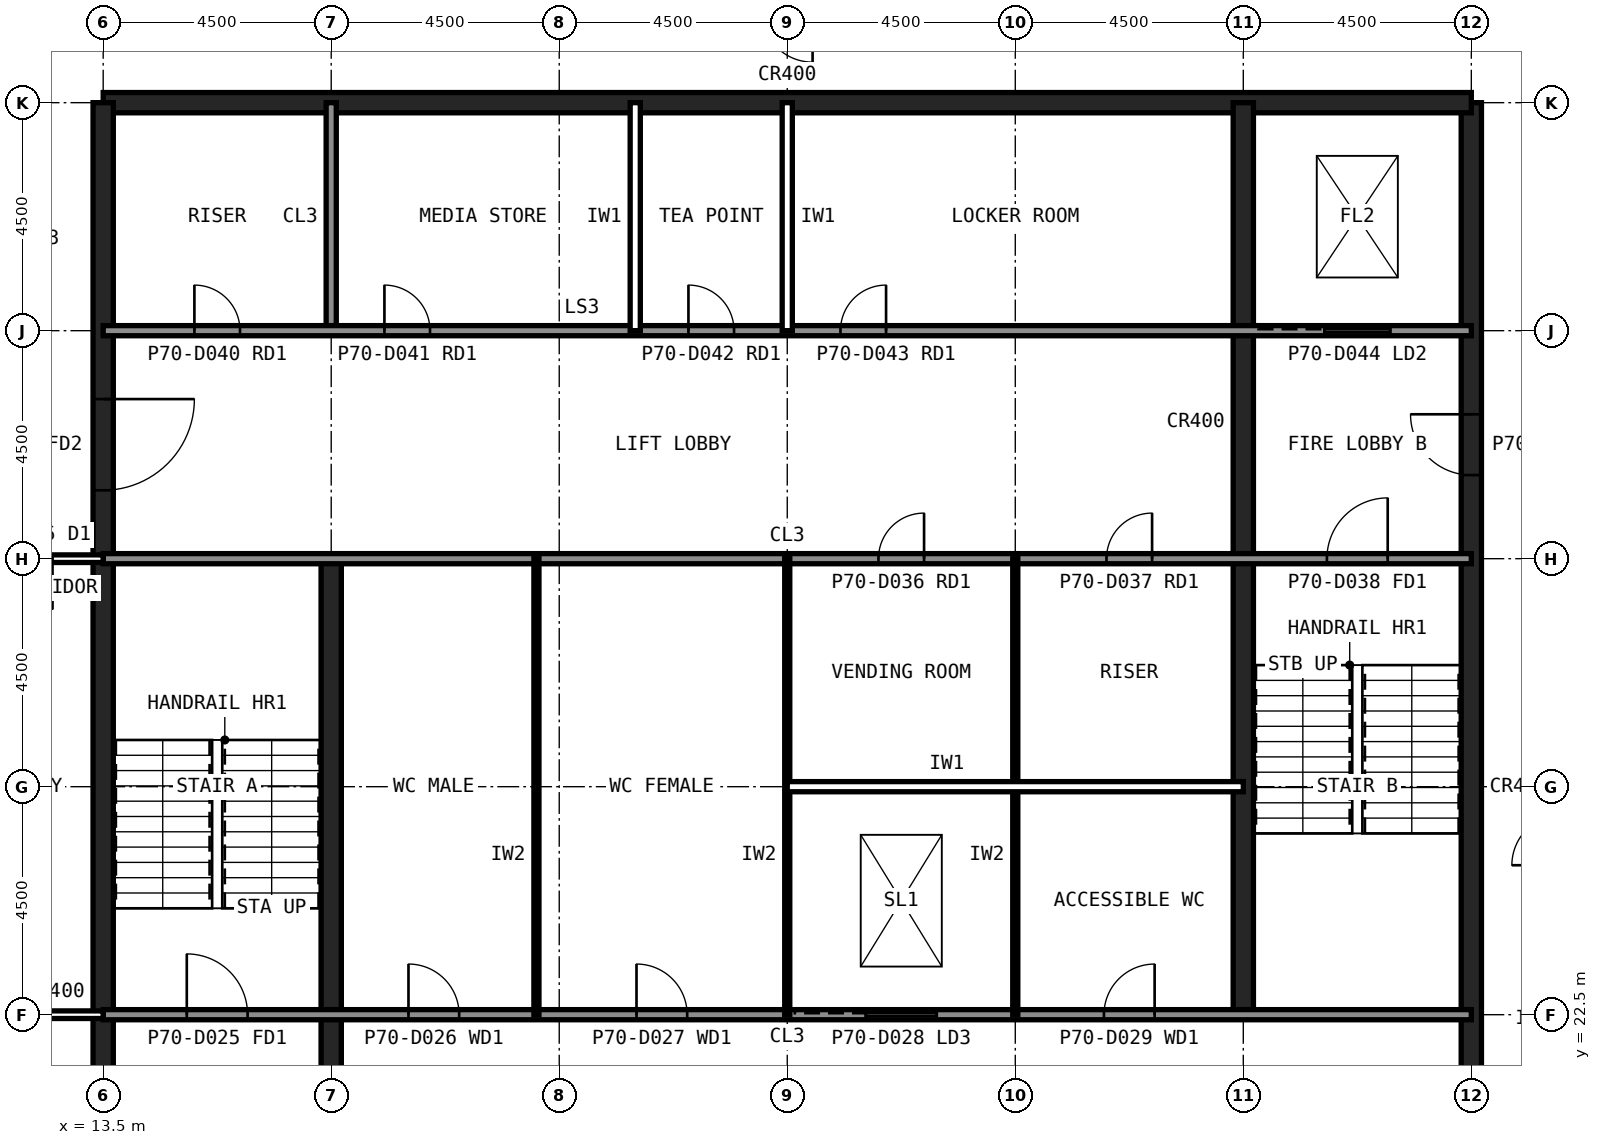
"""IFC4 building model, lengths in metres.
Left out: names, types, materials, properties, quantities, classifications, styles, units other than length and angle.
Written with IfcOpenShell. Run it as: python <this file> out.ifc"""

import sys

from ifc_helpers import new_model, si_unit, direction, frame, frame_2d, origin, place, context, subcontext, project, spatial, rectangle, extrude, element, fill, save


model = new_model("IFC4")
c1 = context("Model", 3, precision=1e-05, world=origin(), true_north=direction((0.0, 1.0)))
c2 = subcontext(c1, "Body", "Model", "MODEL_VIEW")
j1 = project(units=[si_unit("LENGTHUNIT", "METRE"), si_unit("PLANEANGLEUNIT", "RADIAN")], contexts=[c1])
p1 = place(None, origin())
s1 = spatial("IfcSite", under=j1, at=p1, CompositionType="ELEMENT")
p2 = place(p1, origin())
s2 = spatial("IfcBuilding", under=s1, at=p2, CompositionType="ELEMENT")
p3 = place(p2, frame((0.0, 0.0, 294.6)))
s3 = spatial("IfcBuildingStorey", under=s2, at=p3, CompositionType="ELEMENT", Elevation=294.6)
p4 = place(p3, frame((40.5, 13.5, 0.0), z_axis=(0.0, 0.0, 1.0), x_axis=(0.0, 1.0, 0.0)))
e1 = element("IfcWall", 1, at=p4, inside=s3, PredefinedType="SHEAR", context=c2, shape_type="SweptSolid", body=[
    extrude(rectangle(XDim=27.0, YDim=0.4, at=frame_2d((13.5, 0.0))), origin(), (0.0, 0.0, 1.0), 4.0),
])
p5 = place(p4, frame((5.85, 0.0, 0.0)))
e2 = element("IfcOpeningElement", 2, at=p5, cuts=e1, PredefinedType="OPENING", context=c2, shape_type="SweptSolid", body=[
    extrude(rectangle(XDim=1.8, YDim=2.1, at=frame_2d((0.9, 1.05))), frame((0.0, 0.21, 0.0), z_axis=(0.0, -1.0, 0.0), x_axis=(1.0, 0.0, 0.0)), (0.0, 0.0, 1.0), 0.42),
])
p6 = place(p4, frame((19.65, 0.0, 0.0)))
e3 = element("IfcOpeningElement", 3, at=p6, cuts=e1, PredefinedType="OPENING", context=c2, shape_type="SweptSolid", body=[
    extrude(rectangle(XDim=1.2, YDim=2.1, at=frame_2d((0.6, 1.05))), frame((0.0, 0.21, 0.0), z_axis=(0.0, -1.0, 0.0), x_axis=(1.0, 0.0, 0.0)), (0.0, 0.0, 1.0), 0.42),
])
p7 = place(p3, frame((40.5, 40.5, 0.0), z_axis=(0.0, 0.0, 1.0), x_axis=(-1.0, 0.0, 0.0)))
e4 = element("IfcWall", 4, at=p7, inside=s3, PredefinedType="SHEAR", context=c2, shape_type="SweptSolid", body=[
    extrude(rectangle(XDim=27.0, YDim=0.4, at=frame_2d((13.5, 0.0))), origin(), (0.0, 0.0, 1.0), 4.0),
])
p8 = place(p3, frame((13.5, 40.5, 0.0), z_axis=(0.0, 0.0, 1.0), x_axis=(0.0, -1.0, 0.0)))
e5 = element("IfcWall", 5, at=p8, inside=s3, PredefinedType="SHEAR", context=c2, shape_type="SweptSolid", body=[
    extrude(rectangle(XDim=27.0, YDim=0.4, at=frame_2d((13.5, 0.0))), origin(), (0.0, 0.0, 1.0), 4.0),
])
p9 = place(p8, frame((19.65, 0.0, 0.0)))
e6 = element("IfcOpeningElement", 6, at=p9, cuts=e5, PredefinedType="OPENING", context=c2, shape_type="SweptSolid", body=[
    extrude(rectangle(XDim=1.2, YDim=2.1, at=frame_2d((0.6, 1.05))), frame((0.0, 0.21, 0.0), z_axis=(0.0, -1.0, 0.0), x_axis=(1.0, 0.0, 0.0)), (0.0, 0.0, 1.0), 0.42),
])
p10 = place(p8, frame((5.85, 0.0, 0.0)))
e7 = element("IfcOpeningElement", 7, at=p10, cuts=e5, PredefinedType="OPENING", context=c2, shape_type="SweptSolid", body=[
    extrude(rectangle(XDim=1.8, YDim=2.1, at=frame_2d((0.9, 1.05))), frame((0.0, 0.21, 0.0), z_axis=(0.0, -1.0, 0.0), x_axis=(1.0, 0.0, 0.0)), (0.0, 0.0, 1.0), 0.42),
])
p11 = place(p3, frame((18.0, 13.5, 0.0), z_axis=(0.0, 0.0, 1.0), x_axis=(0.0, 1.0, 0.0)))
e8 = element("IfcWall", 8, at=p11, inside=s3, PredefinedType="SHEAR", context=c2, shape_type="SweptSolid", body=[
    extrude(rectangle(XDim=18.0, YDim=0.4, at=frame_2d((9.0, 0.0))), origin(), (0.0, 0.0, 1.0), 4.0),
])
p12 = place(p3, frame((18.0, 36.0, 0.0), z_axis=(0.0, 0.0, 1.0), x_axis=(0.0, 1.0, 0.0)))
e9 = element("IfcWall", 9, at=p12, inside=s3, PredefinedType="SOLIDWALL", context=c2, shape_type="SweptSolid", body=[
    extrude(rectangle(XDim=4.5, YDim=0.2, at=frame_2d((2.25, 0.0))), origin(), (0.0, 0.0, 1.0), 3.84),
])
p13 = place(p3, frame((36.0, 22.5, 0.0), z_axis=(0.0, 0.0, 1.0), x_axis=(0.0, 1.0, 0.0)))
e10 = element("IfcWall", 10, at=p13, inside=s3, PredefinedType="SHEAR", context=c2, shape_type="SweptSolid", body=[
    extrude(rectangle(XDim=18.0, YDim=0.4, at=frame_2d((9.0, 0.0))), origin(), (0.0, 0.0, 1.0), 4.0),
])
p14 = place(p3, frame((13.5, 36.0, 0.0), z_axis=(0.0, 0.0, 1.0), x_axis=(1.0, 0.0, 0.0)))
e11 = element("IfcWall", 11, at=p14, inside=s3, PredefinedType="SOLIDWALL", context=c2, shape_type="SweptSolid", body=[
    extrude(rectangle(XDim=27.0, YDim=0.2, at=frame_2d((13.5, 0.0))), origin(), (0.0, 0.0, 1.0), 3.84),
])
p15 = place(p14, frame((1.8, 0.0, 0.0)))
e12 = element("IfcOpeningElement", 12, at=p15, cuts=e11, PredefinedType="OPENING", context=c2, shape_type="SweptSolid", body=[
    extrude(rectangle(XDim=0.9, YDim=2.1, at=frame_2d((0.45, 1.05))), frame((0.0, 0.11, 0.0), z_axis=(0.0, -1.0, 0.0), x_axis=(1.0, 0.0, 0.0)), (0.0, 0.0, 1.0), 0.22),
])
p16 = place(p14, frame((5.55, 0.0, 0.0)))
e13 = element("IfcOpeningElement", 13, at=p16, cuts=e11, PredefinedType="OPENING", context=c2, shape_type="SweptSolid", body=[
    extrude(rectangle(XDim=0.9, YDim=2.1, at=frame_2d((0.45, 1.05))), frame((0.0, 0.11, 0.0), z_axis=(0.0, -1.0, 0.0), x_axis=(1.0, 0.0, 0.0)), (0.0, 0.0, 1.0), 0.22),
])
p17 = place(p14, frame((11.55, 0.0, 0.0)))
e14 = element("IfcOpeningElement", 14, at=p17, cuts=e11, PredefinedType="OPENING", context=c2, shape_type="SweptSolid", body=[
    extrude(rectangle(XDim=0.9, YDim=2.1, at=frame_2d((0.45, 1.05))), frame((0.0, 0.11, 0.0), z_axis=(0.0, -1.0, 0.0), x_axis=(1.0, 0.0, 0.0)), (0.0, 0.0, 1.0), 0.22),
])
p18 = place(p14, frame((14.55, 0.0, 0.0)))
e15 = element("IfcOpeningElement", 15, at=p18, cuts=e11, PredefinedType="OPENING", context=c2, shape_type="SweptSolid", body=[
    extrude(rectangle(XDim=0.9, YDim=2.1, at=frame_2d((0.45, 1.05))), frame((0.0, 0.11, 0.0), z_axis=(0.0, -1.0, 0.0), x_axis=(1.0, 0.0, 0.0)), (0.0, 0.0, 1.0), 0.22),
])
p19 = place(p14, frame((24.1, 0.0, 0.0)))
e16 = element("IfcOpeningElement", 16, at=p19, cuts=e11, PredefinedType="OPENING", context=c2, shape_type="SweptSolid", body=[
    extrude(rectangle(XDim=1.3, YDim=2.2, at=frame_2d((0.65, 1.1))), frame((0.0, 0.11, 0.0), z_axis=(0.0, -1.0, 0.0), x_axis=(1.0, 0.0, 0.0)), (0.0, 0.0, 1.0), 0.22),
])
p20 = place(p3, frame((13.5, 22.5, 0.0), z_axis=(0.0, 0.0, 1.0), x_axis=(1.0, 0.0, 0.0)))
e17 = element("IfcWall", 17, at=p20, inside=s3, PredefinedType="SOLIDWALL", context=c2, shape_type="SweptSolid", body=[
    extrude(rectangle(XDim=27.0, YDim=0.2, at=frame_2d((13.5, 0.0))), origin(), (0.0, 0.0, 1.0), 3.84),
])
p21 = place(p20, frame((1.65, 0.0, 0.0)))
e18 = element("IfcOpeningElement", 18, at=p21, cuts=e17, PredefinedType="OPENING", context=c2, shape_type="SweptSolid", body=[
    extrude(rectangle(XDim=1.2, YDim=2.1, at=frame_2d((0.6, 1.05))), frame((0.0, 0.11, 0.0), z_axis=(0.0, -1.0, 0.0), x_axis=(1.0, 0.0, 0.0)), (0.0, 0.0, 1.0), 0.22),
])
p22 = place(p20, frame((6.025, 0.0, 0.0)))
e19 = element("IfcOpeningElement", 19, at=p22, cuts=e17, PredefinedType="OPENING", context=c2, shape_type="SweptSolid", body=[
    extrude(rectangle(XDim=1.0, YDim=2.1, at=frame_2d((0.5, 1.05))), frame((0.0, 0.11, 0.0), z_axis=(0.0, -1.0, 0.0), x_axis=(1.0, 0.0, 0.0)), (0.0, 0.0, 1.0), 0.22),
])
p23 = place(p20, frame((10.525, 0.0, 0.0)))
e20 = element("IfcOpeningElement", 20, at=p23, cuts=e17, PredefinedType="OPENING", context=c2, shape_type="SweptSolid", body=[
    extrude(rectangle(XDim=1.0, YDim=2.1, at=frame_2d((0.5, 1.05))), frame((0.0, 0.11, 0.0), z_axis=(0.0, -1.0, 0.0), x_axis=(1.0, 0.0, 0.0)), (0.0, 0.0, 1.0), 0.22),
])
p24 = place(p20, frame((19.75, 0.0, 0.0)))
e21 = element("IfcOpeningElement", 21, at=p24, cuts=e17, PredefinedType="OPENING", context=c2, shape_type="SweptSolid", body=[
    extrude(rectangle(XDim=1.0, YDim=2.1, at=frame_2d((0.5, 1.05))), frame((0.0, 0.11, 0.0), z_axis=(0.0, -1.0, 0.0), x_axis=(1.0, 0.0, 0.0)), (0.0, 0.0, 1.0), 0.22),
])
p25 = place(p20, frame((15.05, 0.0, 0.0)))
e22 = element("IfcOpeningElement", 22, at=p25, cuts=e17, PredefinedType="OPENING", context=c2, shape_type="SweptSolid", body=[
    extrude(rectangle(XDim=1.4, YDim=2.4, at=frame_2d((0.7, 1.2))), frame((0.0, 0.11, 0.0), z_axis=(0.0, -1.0, 0.0), x_axis=(1.0, 0.0, 0.0)), (0.0, 0.0, 1.0), 0.22),
])
p26 = place(p3, frame((13.5, 31.5, 0.0), z_axis=(0.0, 0.0, 1.0), x_axis=(1.0, 0.0, 0.0)))
e23 = element("IfcWall", 23, at=p26, inside=s3, PredefinedType="SOLIDWALL", context=c2, shape_type="SweptSolid", body=[
    extrude(rectangle(XDim=27.0, YDim=0.2, at=frame_2d((13.5, 0.0))), origin(), (0.0, 0.0, 1.0), 3.84),
])
p27 = place(p26, frame((24.15, 0.0, 0.0)))
e24 = element("IfcOpeningElement", 24, at=p27, cuts=e23, PredefinedType="OPENING", context=c2, shape_type="SweptSolid", body=[
    extrude(rectangle(XDim=1.2, YDim=2.1, at=frame_2d((0.6, 1.05))), frame((0.0, 0.11, 0.0), z_axis=(0.0, -1.0, 0.0), x_axis=(1.0, 0.0, 0.0)), (0.0, 0.0, 1.0), 0.22),
])
p28 = place(p26, frame((15.3, 0.0, 0.0)))
e25 = element("IfcOpeningElement", 25, at=p28, cuts=e23, PredefinedType="OPENING", context=c2, shape_type="SweptSolid", body=[
    extrude(rectangle(XDim=0.9, YDim=2.1, at=frame_2d((0.45, 1.05))), frame((0.0, 0.11, 0.0), z_axis=(0.0, -1.0, 0.0), x_axis=(1.0, 0.0, 0.0)), (0.0, 0.0, 1.0), 0.22),
])
p29 = place(p26, frame((19.8, 0.0, 0.0)))
e26 = element("IfcOpeningElement", 26, at=p29, cuts=e23, PredefinedType="OPENING", context=c2, shape_type="SweptSolid", body=[
    extrude(rectangle(XDim=0.9, YDim=2.1, at=frame_2d((0.45, 1.05))), frame((0.0, 0.11, 0.0), z_axis=(0.0, -1.0, 0.0), x_axis=(1.0, 0.0, 0.0)), (0.0, 0.0, 1.0), 0.22),
])
for number, where, z_axis, x_axis in (
    (27, (24.0, 36.0, 0.0), (0.0, 0.0, 1.0), (0.0, 1.0, 0.0)),
    (28, (27.0, 36.0, 0.0), (0.0, 0.0, 1.0), (0.0, 1.0, 0.0)),
):
    element("IfcWall", number, at=place(p3, frame(where, z_axis=z_axis, x_axis=x_axis)), inside=s3, PredefinedType="PARTITIONING", context=c2, shape_type="SweptSolid", body=[
        extrude(rectangle(XDim=4.5, YDim=0.2, at=frame_2d((2.25, 0.0))), origin(), (0.0, 0.0, 1.0), 3.84),
    ])
for number, where, z_axis, x_axis in (
    (29, (22.05, 22.5, 0.0), (0.0, 0.0, 1.0), (0.0, 1.0, 0.0)),
    (30, (27.0, 22.5, 0.0), (0.0, 0.0, 1.0), (0.0, 1.0, 0.0)),
    (31, (31.5, 22.5, 0.0), (0.0, 0.0, 1.0), (0.0, 1.0, 0.0)),
):
    element("IfcWall", number, at=place(p3, frame(where, z_axis=z_axis, x_axis=x_axis)), inside=s3, PredefinedType="PLUMBINGWALL", context=c2, shape_type="SweptSolid", body=[
        extrude(rectangle(XDim=9.0, YDim=0.1, at=frame_2d((4.5, 0.0))), origin(), (0.0, 0.0, 1.0), 3.84),
    ])
p30 = place(p3, frame((27.0, 27.0, 0.0), z_axis=(0.0, 0.0, 1.0), x_axis=(1.0, 0.0, 0.0)))
e32 = element("IfcWall", 32, at=p30, inside=s3, PredefinedType="PARTITIONING", context=c2, shape_type="SweptSolid", body=[
    extrude(rectangle(XDim=9.0, YDim=0.2, at=frame_2d((4.5, 0.0))), origin(), (0.0, 0.0, 1.0), 3.84),
])
p31 = place(p3, frame((10.5, 22.5, 0.0), z_axis=(0.0, 0.0, 1.0), x_axis=(1.0, 0.0, 0.0)))
e33 = element("IfcWall", 33, at=p31, inside=s3, PredefinedType="PARTITIONING", context=c2, shape_type="SweptSolid", body=[
    extrude(rectangle(XDim=3.0, YDim=0.15, at=frame_2d((1.5, 0.0))), origin(), (0.0, 0.0, 1.0), 2.989),
])
p32 = place(p3, frame((13.5, 31.5, 0.0), z_axis=(0.0, 0.0, 1.0), x_axis=(-1.0, 0.0, 0.0)))
e34 = element("IfcWall", 34, at=p32, inside=s3, PredefinedType="PARTITIONING", context=c2, shape_type="SweptSolid", body=[
    extrude(rectangle(XDim=3.0, YDim=0.15, at=frame_2d((1.5, 0.0))), origin(), (0.0, 0.0, 1.0), 2.989),
])
p33 = place(p32, frame((1.0, 0.0, 0.0)))
e35 = element("IfcOpeningElement", 35, at=p33, cuts=e34, PredefinedType="OPENING", context=c2, shape_type="SweptSolid", body=[
    extrude(rectangle(XDim=1.0, YDim=2.1, at=frame_2d((0.5, 1.05))), frame((0.0, 0.085, 0.0), z_axis=(0.0, -1.0, 0.0), x_axis=(1.0, 0.0, 0.0)), (0.0, 0.0, 1.0), 0.17),
])
p34 = place(p10, origin())
e36 = element("IfcDoor", 36, at=p34, inside=s3, OperationType="SINGLE_SWING_LEFT", PredefinedType="DOOR", context=c2, shape_type="SweptSolid", body=[
    extrude(rectangle(XDim=1.8, YDim=2.1, at=frame_2d((0.9, 1.05))), frame((0.0, 0.025, 0.0), z_axis=(0.0, -1.0, 0.0), x_axis=(1.0, 0.0, 0.0)), (0.0, 0.0, 1.0), 0.05),
])
fill(e7, e36)
p35 = place(p6, origin())
e37 = element("IfcDoor", 37, at=p35, inside=s3, OperationType="SINGLE_SWING_RIGHT", PredefinedType="DOOR", context=c2, shape_type="SweptSolid", body=[
    extrude(rectangle(XDim=1.2, YDim=2.1, at=frame_2d((0.6, 1.05))), frame((0.0, 0.025, 0.0), z_axis=(0.0, -1.0, 0.0), x_axis=(1.0, 0.0, 0.0)), (0.0, 0.0, 1.0), 0.05),
])
fill(e3, e37)
p36 = place(p21, origin())
e38 = element("IfcDoor", 38, at=p36, inside=s3, OperationType="SINGLE_SWING_LEFT", PredefinedType="DOOR", context=c2, shape_type="SweptSolid", body=[
    extrude(rectangle(XDim=1.2, YDim=2.1, at=frame_2d((0.6, 1.05))), frame((0.0, 0.025, 0.0), z_axis=(0.0, -1.0, 0.0), x_axis=(1.0, 0.0, 0.0)), (0.0, 0.0, 1.0), 0.05),
])
fill(e18, e38)
p37 = place(p27, origin())
e39 = element("IfcDoor", 39, at=p37, inside=s3, OperationType="SINGLE_SWING_RIGHT", PredefinedType="DOOR", context=c2, shape_type="SweptSolid", body=[
    extrude(rectangle(XDim=1.2, YDim=2.1, at=frame_2d((0.6, 1.05))), frame((0.0, 0.025, 0.0), z_axis=(0.0, -1.0, 0.0), x_axis=(1.0, 0.0, 0.0)), (0.0, 0.0, 1.0), 0.05),
])
fill(e24, e39)
p38 = place(p22, origin())
e40 = element("IfcDoor", 40, at=p38, inside=s3, OperationType="SINGLE_SWING_LEFT", PredefinedType="DOOR", context=c2, shape_type="SweptSolid", body=[
    extrude(rectangle(XDim=1.0, YDim=2.1, at=frame_2d((0.5, 1.05))), frame((0.0, 0.025, 0.0), z_axis=(0.0, -1.0, 0.0), x_axis=(1.0, 0.0, 0.0)), (0.0, 0.0, 1.0), 0.05),
])
fill(e19, e40)
p39 = place(p23, origin())
e41 = element("IfcDoor", 41, at=p39, inside=s3, OperationType="SINGLE_SWING_LEFT", PredefinedType="DOOR", context=c2, shape_type="SweptSolid", body=[
    extrude(rectangle(XDim=1.0, YDim=2.1, at=frame_2d((0.5, 1.05))), frame((0.0, 0.025, 0.0), z_axis=(0.0, -1.0, 0.0), x_axis=(1.0, 0.0, 0.0)), (0.0, 0.0, 1.0), 0.05),
])
fill(e20, e41)
p40 = place(p24, origin())
e42 = element("IfcDoor", 42, at=p40, inside=s3, OperationType="SINGLE_SWING_RIGHT", PredefinedType="DOOR", context=c2, shape_type="SweptSolid", body=[
    extrude(rectangle(XDim=1.0, YDim=2.1, at=frame_2d((0.5, 1.05))), frame((0.0, 0.025, 0.0), z_axis=(0.0, -1.0, 0.0), x_axis=(1.0, 0.0, 0.0)), (0.0, 0.0, 1.0), 0.05),
])
fill(e21, e42)
p41 = place(p28, origin())
e43 = element("IfcDoor", 43, at=p41, inside=s3, OperationType="SINGLE_SWING_RIGHT", PredefinedType="DOOR", context=c2, shape_type="SweptSolid", body=[
    extrude(rectangle(XDim=0.9, YDim=2.1, at=frame_2d((0.45, 1.05))), frame((0.0, 0.025, 0.0), z_axis=(0.0, -1.0, 0.0), x_axis=(1.0, 0.0, 0.0)), (0.0, 0.0, 1.0), 0.05),
])
fill(e25, e43)
p42 = place(p29, origin())
e44 = element("IfcDoor", 44, at=p42, inside=s3, OperationType="SINGLE_SWING_RIGHT", PredefinedType="DOOR", context=c2, shape_type="SweptSolid", body=[
    extrude(rectangle(XDim=0.9, YDim=2.1, at=frame_2d((0.45, 1.05))), frame((0.0, 0.025, 0.0), z_axis=(0.0, -1.0, 0.0), x_axis=(1.0, 0.0, 0.0)), (0.0, 0.0, 1.0), 0.05),
])
fill(e26, e44)
p43 = place(p15, origin())
e45 = element("IfcDoor", 45, at=p43, inside=s3, OperationType="SINGLE_SWING_LEFT", PredefinedType="DOOR", context=c2, shape_type="SweptSolid", body=[
    extrude(rectangle(XDim=0.9, YDim=2.1, at=frame_2d((0.45, 1.05))), frame((0.0, 0.025, 0.0), z_axis=(0.0, -1.0, 0.0), x_axis=(1.0, 0.0, 0.0)), (0.0, 0.0, 1.0), 0.05),
])
fill(e12, e45)
p44 = place(p16, origin())
e46 = element("IfcDoor", 46, at=p44, inside=s3, OperationType="SINGLE_SWING_LEFT", PredefinedType="DOOR", context=c2, shape_type="SweptSolid", body=[
    extrude(rectangle(XDim=0.9, YDim=2.1, at=frame_2d((0.45, 1.05))), frame((0.0, 0.025, 0.0), z_axis=(0.0, -1.0, 0.0), x_axis=(1.0, 0.0, 0.0)), (0.0, 0.0, 1.0), 0.05),
])
fill(e13, e46)
p45 = place(p17, origin())
e47 = element("IfcDoor", 47, at=p45, inside=s3, OperationType="SINGLE_SWING_LEFT", PredefinedType="DOOR", context=c2, shape_type="SweptSolid", body=[
    extrude(rectangle(XDim=0.9, YDim=2.1, at=frame_2d((0.45, 1.05))), frame((0.0, 0.025, 0.0), z_axis=(0.0, -1.0, 0.0), x_axis=(1.0, 0.0, 0.0)), (0.0, 0.0, 1.0), 0.05),
])
fill(e14, e47)
p46 = place(p18, origin())
e48 = element("IfcDoor", 48, at=p46, inside=s3, OperationType="SINGLE_SWING_RIGHT", PredefinedType="DOOR", context=c2, shape_type="SweptSolid", body=[
    extrude(rectangle(XDim=0.9, YDim=2.1, at=frame_2d((0.45, 1.05))), frame((0.0, 0.025, 0.0), z_axis=(0.0, -1.0, 0.0), x_axis=(1.0, 0.0, 0.0)), (0.0, 0.0, 1.0), 0.05),
])
fill(e15, e48)
p47 = place(p19, origin())
e49 = element("IfcDoor", 49, at=p47, inside=s3, OperationType="SLIDING_TO_LEFT", PredefinedType="DOOR", context=c2, shape_type="SweptSolid", body=[
    extrude(rectangle(XDim=1.3, YDim=2.2, at=frame_2d((0.65, 1.1))), frame((0.0, 0.025, 0.0), z_axis=(0.0, -1.0, 0.0), x_axis=(1.0, 0.0, 0.0)), (0.0, 0.0, 1.0), 0.05),
])
fill(e16, e49)
p48 = place(p25, origin())
e50 = element("IfcDoor", 50, at=p48, inside=s3, OperationType="SLIDING_TO_LEFT", PredefinedType="DOOR", context=c2, shape_type="SweptSolid", body=[
    extrude(rectangle(XDim=1.4, YDim=2.4, at=frame_2d((0.7, 1.2))), frame((0.0, 0.025, 0.0), z_axis=(0.0, -1.0, 0.0), x_axis=(1.0, 0.0, 0.0)), (0.0, 0.0, 1.0), 0.05),
])
fill(e22, e50)
save(model, sys.argv[1])
